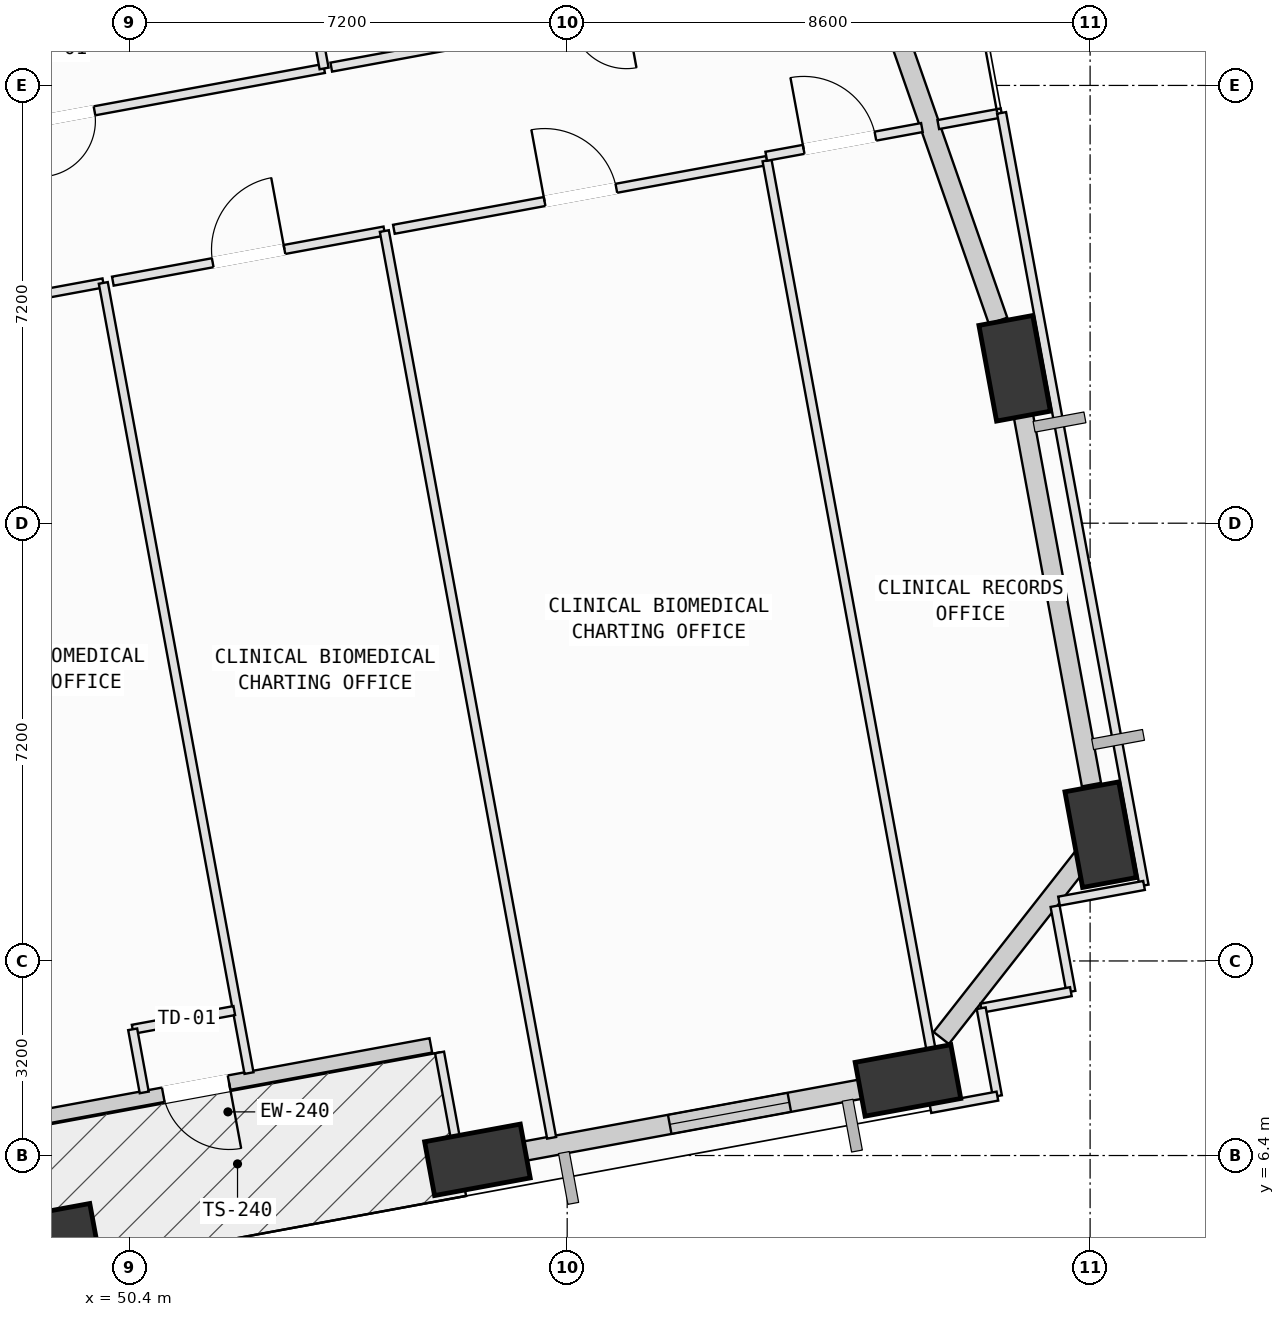
"""IFC4 building model, lengths in metres.
Left out: names, types, materials, properties, quantities, classifications, styles, units other than length and angle.
Written with IfcOpenShell. Run it as: python <this file> out.ifc"""

import sys

from ifc_helpers import new_model, si_unit, direction, frame, frame_2d, origin, origin_2d, place, context, subcontext, project, spatial, rectangle, extrude, element, fill, save


model = new_model("IFC4")
c1 = context("Model", 3, precision=1e-05, world=origin(), true_north=direction((0.0, 1.0)))
c2 = subcontext(c1, "Body", "Model", "MODEL_VIEW")
j1 = project(units=[si_unit("LENGTHUNIT", "METRE"), si_unit("PLANEANGLEUNIT", "RADIAN")], contexts=[c1])
p1 = place(None, origin())
s1 = spatial("IfcSite", under=j1, at=p1, CompositionType="ELEMENT")
p2 = place(p1, origin())
s2 = spatial("IfcBuilding", under=s1, at=p2, CompositionType="ELEMENT")
p3 = place(p2, frame((0.0, 0.0, 67.0)))
s3 = spatial("IfcBuildingStorey", under=s2, at=p3, CompositionType="ELEMENT", Elevation=67.0)
p4 = place(p3, frame((49.043, 5.023, 0.002), z_axis=(0.080992624248, 0.064344477929, 0.994635603112), x_axis=(-0.752977498779, 0.657778746776, 0.018761839526)))
e1 = element("IfcColumn", 1, at=p4, inside=s3, PredefinedType="COLUMN", context=c2, shape_type="SweptSolid", body=[
    extrude(rectangle(XDim=1.6, YDim=0.9, at=origin_2d()), origin(), (0.0, 0.0, 1.0), 4.018),
])
p5 = place(p3, frame((56.124, 6.329, 0.002), z_axis=(0.075202216603, 0.093335654317, 0.992790553063), x_axis=(-0.878753282804, 0.476780901997, 0.021740272603)))
e2 = element("IfcColumn", 2, at=p5, inside=s3, PredefinedType="COLUMN", context=c2, shape_type="SweptSolid", body=[
    extrude(rectangle(XDim=1.6, YDim=0.9, at=origin_2d()), origin(), (0.0, 0.0, 1.0), 4.026),
])
p6 = place(p3, frame((63.205, 7.635, 0.002), z_axis=(0.069432937009, 0.122112456291, 0.990084650561), x_axis=(-0.943645250183, 0.329976499913, 0.025478448008)))
e3 = element("IfcColumn", 3, at=p6, inside=s3, PredefinedType="COLUMN", context=c2, shape_type="SweptSolid", body=[
    extrude(rectangle(XDim=1.6, YDim=0.9, at=origin_2d()), origin(), (0.0, 0.0, 1.0), 4.037),
])
p7 = place(p3, frame((66.374, 11.677, 0.002), z_axis=(0.052706899267, 0.13484987645, 0.989463235088), x_axis=(-0.185294966749, -0.972313163776, 0.142382888173)))
e4 = element("IfcColumn", 4, at=p7, inside=s3, PredefinedType="COLUMN", context=c2, shape_type="SweptSolid", body=[
    extrude(rectangle(XDim=1.6, YDim=0.9, at=origin_2d()), origin(), (0.0, 0.0, 1.0), 4.039),
])
p8 = place(p3, frame((64.959, 19.348, 0.002), z_axis=(0.021317992834, 0.12905864412, 0.991407791759), x_axis=(0.020060394066, -0.99148872424, 0.128637826063)))
e5 = element("IfcColumn", 5, at=p8, inside=s3, PredefinedType="COLUMN", context=c2, shape_type="SweptSolid", body=[
    extrude(rectangle(XDim=1.6, YDim=0.9, at=origin_2d()), origin(), (0.0, 0.0, 1.0), 4.031),
])
p9 = place(p3, frame((55.358, 8.211, 0.0), z_axis=(0.0, 0.0, 1.0), x_axis=(-0.983411553053, -0.181388305362, 0.0)))
e6 = element("IfcWall", 6, at=p9, inside=s3, PredefinedType="SOLIDWALL", context=c2, shape_type="SweptSolid", body=[
    extrude(rectangle(XDim=6.96, YDim=0.24, at=frame_2d((3.48, 0.0))), origin(), (0.0, 0.0, 1.0), 3.165),
])
p10 = place(p9, frame((3.375, 0.0, 0.0)))
e7 = element("IfcOpeningElement", 7, at=p10, cuts=e6, PredefinedType="OPENING", context=c2, shape_type="SweptSolid", body=[
    extrude(rectangle(XDim=1.1, YDim=2.15, at=frame_2d((0.55, 1.075))), frame((0.0, 0.13, 0.0), z_axis=(0.0, -1.0, 0.0), x_axis=(1.0, 0.0, 0.0)), (0.0, 0.0, 1.0), 0.26),
])
p11 = place(p3, frame((62.826, 7.565, 0.0), z_axis=(0.0, 0.0, 1.0), x_axis=(-0.983418326153, -0.181351580599, 0.0)))
e8 = element("IfcWall", 8, at=p11, inside=s3, PredefinedType="SOLIDWALL", context=c2, shape_type="SweptSolid", body=[
    extrude(rectangle(XDim=6.045, YDim=0.32, at=frame_2d((3.022, 0.0))), origin(), (0.0, 0.0, 1.0), 3.145),
])
p12 = place(p11, frame((1.599, 0.0, 0.75)))
e9 = element("IfcOpeningElement", 9, at=p12, cuts=e8, PredefinedType="OPENING", context=c2, shape_type="SweptSolid", body=[
    extrude(rectangle(XDim=2.0, YDim=1.95, at=frame_2d((1.0, 0.975))), frame((0.0, 0.17, 0.0), z_axis=(0.0, -1.0, 0.0), x_axis=(1.0, 0.0, 0.0)), (0.0, 0.0, 1.0), 0.34),
])
p13 = place(p3, frame((66.175, 11.424, 0.0), z_axis=(0.0, 0.0, 1.0), x_axis=(-0.617077298218, -0.786902540359, 0.0)))
e10 = element("IfcWall", 10, at=p13, inside=s3, PredefinedType="SOLIDWALL", context=c2, shape_type="SweptSolid", body=[
    extrude(rectangle(XDim=3.927, YDim=0.32, at=frame_2d((1.964, 0.0))), origin(), (0.0, 0.0, 1.0), 3.165),
])
p14 = place(p3, frame((65.023, 19.0, 0.0), z_axis=(0.0, 0.0, 1.0), x_axis=(0.181377690028, -0.983413510971, 0.0)))
e11 = element("IfcWall", 11, at=p14, inside=s3, PredefinedType="SOLIDWALL", context=c2, shape_type="SweptSolid", body=[
    extrude(rectangle(XDim=6.61, YDim=0.32, at=frame_2d((3.305, 0.0))), origin(), (0.0, 0.0, 1.0), 3.165),
])
p15 = place(p3, frame((61.848, 28.26, 0.0), z_axis=(0.0, 0.0, 1.0), x_axis=(0.329546090906, -0.944139488618, 0.0)))
e12 = element("IfcWall", 12, at=p15, inside=s3, PredefinedType="SOLIDWALL", context=c2, shape_type="SweptSolid", body=[
    extrude(rectangle(XDim=8.614, YDim=0.32, at=frame_2d((4.307, 0.0))), origin(), (0.0, 0.0, 1.0), 3.165),
])
p16 = place(p3, frame((45.506, 19.929, 0.0), z_axis=(0.0, 0.0, 1.0), x_axis=(0.983432507903, 0.181274660113, 0.0)))
e13 = element("IfcWall", 13, at=p16, inside=s3, PredefinedType="PARTITIONING", context=c2, shape_type="SweptSolid", body=[
    extrude(rectangle(XDim=4.54, YDim=0.15, at=frame_2d((2.27, 0.0))), origin(), (0.0, 0.0, 1.0), 3.78),
])
p17 = place(p16, frame((1.67, 0.0, 0.0)))
e14 = element("IfcOpeningElement", 14, at=p17, cuts=e13, PredefinedType="OPENING", context=c2, shape_type="SweptSolid", body=[
    extrude(rectangle(XDim=1.2, YDim=2.15, at=frame_2d((0.6, 1.075))), frame((0.0, 0.085, 0.0), z_axis=(0.0, -1.0, 0.0), x_axis=(1.0, 0.0, 0.0)), (0.0, 0.0, 1.0), 0.17),
])
p18 = place(p3, frame((49.971, 20.752, 0.0), z_axis=(0.0, 0.0, 1.0), x_axis=(0.181310546622, -0.983425892319, 0.0)))
e15 = element("IfcWall", 15, at=p18, inside=s3, PredefinedType="PARTITIONING", context=c2, shape_type="SweptSolid", body=[
    extrude(rectangle(XDim=13.215, YDim=0.15, at=frame_2d((6.607, 0.0))), origin(), (0.0, 0.0, 1.0), 3.78),
])
p19 = place(p3, frame((52.125, 8.784, 0.0), z_axis=(0.0, 0.0, 1.0), x_axis=(-0.983446450717, -0.181199002682, 0.0)))
e16 = element("IfcWall", 16, at=p19, inside=s3, PredefinedType="PARTITIONING", context=c2, shape_type="SweptSolid", body=[
    extrude(rectangle(XDim=1.699, YDim=0.15, at=frame_2d((0.85, 0.0))), origin(), (0.0, 0.0, 1.0), 3.78),
])
p20 = place(p3, frame((50.454, 8.476, 0.0), z_axis=(0.0, 0.0, 1.0), x_axis=(0.179984667326, -0.983669415773, 0.0)))
e17 = element("IfcWall", 17, at=p20, inside=s3, PredefinedType="PARTITIONING", context=c2, shape_type="SweptSolid", body=[
    extrude(rectangle(XDim=1.055, YDim=0.15, at=frame_2d((0.528, 0.0))), origin(), (0.0, 0.0, 1.0), 3.78),
])
p21 = place(p3, frame((50.128, 20.781, 0.0), z_axis=(0.0, 0.0, 1.0), x_axis=(0.983395912318, 0.181473082403, 0.0)))
e18 = element("IfcWall", 18, at=p21, inside=s3, PredefinedType="PARTITIONING", context=c2, shape_type="SweptSolid", body=[
    extrude(rectangle(XDim=4.541, YDim=0.15, at=frame_2d((2.27, 0.0))), origin(), (0.0, 0.0, 1.0), 3.78),
])
p22 = place(p21, frame((1.67, 0.0, 0.0)))
e19 = element("IfcOpeningElement", 19, at=p22, cuts=e18, PredefinedType="OPENING", context=c2, shape_type="SweptSolid", body=[
    extrude(rectangle(XDim=1.2, YDim=2.15, at=frame_2d((0.6, 1.075))), frame((0.0, 0.085, 0.0), z_axis=(0.0, -1.0, 0.0), x_axis=(1.0, 0.0, 0.0)), (0.0, 0.0, 1.0), 0.17),
])
p23 = place(p3, frame((54.593, 21.605, 0.0), z_axis=(0.0, 0.0, 1.0), x_axis=(0.181395153652, -0.983410289875, 0.0)))
e20 = element("IfcWall", 20, at=p23, inside=s3, PredefinedType="PARTITIONING", context=c2, shape_type="SweptSolid", body=[
    extrude(rectangle(XDim=15.166, YDim=0.15, at=frame_2d((7.583, 0.0))), origin(), (0.0, 0.0, 1.0), 3.78),
])
p24 = place(p3, frame((56.923, 6.242, 0.0), z_axis=(0.0, 0.0, 1.0), x_axis=(-0.983559660352, -0.180583483541, 0.0)))
e21 = element("IfcWall", 21, at=p24, inside=s3, PredefinedType="PARTITIONING", context=c2, shape_type="SweptSolid", body=[
    extrude(rectangle(XDim=1.063, YDim=0.15, at=frame_2d((0.531, 0.0))), origin(), (0.0, 0.0, 1.0), 3.78),
])
p25 = place(p3, frame((55.878, 6.05, 0.0), z_axis=(0.0, 0.0, 1.0), x_axis=(-0.181281962035, 0.983431161923, 0.0)))
e22 = element("IfcWall", 22, at=p25, inside=s3, PredefinedType="PARTITIONING", context=c2, shape_type="SweptSolid", body=[
    extrude(rectangle(XDim=2.079, YDim=0.15, at=frame_2d((1.04, 0.0))), origin(), (0.0, 0.0, 1.0), 3.78),
])
p26 = place(p3, frame((54.75, 21.634, 0.0), z_axis=(0.0, 0.0, 1.0), x_axis=(0.983442731357, 0.181219188115, 0.0)))
e23 = element("IfcWall", 23, at=p26, inside=s3, PredefinedType="PARTITIONING", context=c2, shape_type="SweptSolid", body=[
    extrude(rectangle(XDim=6.24, YDim=0.15, at=frame_2d((3.12, 0.0))), origin(), (0.0, 0.0, 1.0), 3.78),
])
p27 = place(p26, frame((2.52, 0.0, 0.0)))
e24 = element("IfcOpeningElement", 24, at=p27, cuts=e23, PredefinedType="OPENING", context=c2, shape_type="SweptSolid", body=[
    extrude(rectangle(XDim=1.2, YDim=2.15, at=frame_2d((0.6, 1.075))), frame((0.0, 0.085, 0.0), z_axis=(0.0, -1.0, 0.0), x_axis=(1.0, 0.0, 0.0)), (0.0, 0.0, 1.0), 0.17),
])
p28 = place(p3, frame((60.887, 22.765, 0.0), z_axis=(0.0, 0.0, 1.0), x_axis=(0.181328083702, -0.983422658912, 0.0)))
e25 = element("IfcWall", 25, at=p28, inside=s3, PredefinedType="PARTITIONING", context=c2, shape_type="SweptSolid", body=[
    extrude(rectangle(XDim=15.529, YDim=0.15, at=frame_2d((7.765, 0.0))), origin(), (0.0, 0.0, 1.0), 3.78),
])
p29 = place(p3, frame((63.703, 7.493, 0.0), z_axis=(0.0, 0.0, 1.0), x_axis=(-0.983490875229, -0.18095772529, 0.0)))
e26 = element("IfcWall", 26, at=p29, inside=s3, PredefinedType="PARTITIONING", context=c2, shape_type="SweptSolid", body=[
    extrude(rectangle(XDim=0.85, YDim=0.15, at=frame_2d((0.425, 0.0))), origin(), (0.0, 0.0, 1.0), 3.78),
])
p30 = place(p3, frame((53.602, 24.279, 0.0), z_axis=(0.0, 0.0, 1.0), x_axis=(-0.983407902238, -0.181408097439, 0.0)))
e27 = element("IfcWall", 27, at=p30, inside=s3, PredefinedType="PARTITIONING", context=c2, shape_type="SweptSolid", body=[
    extrude(rectangle(XDim=8.6, YDim=0.15, at=frame_2d((4.3, 0.0))), origin(), (0.0, 0.0, 1.0), 3.78),
])
p31 = place(p30, frame((3.84, 0.0, 0.0)))
e28 = element("IfcOpeningElement", 28, at=p31, cuts=e27, PredefinedType="OPENING", context=c2, shape_type="SweptSolid", body=[
    extrude(rectangle(XDim=0.92, YDim=2.1, at=frame_2d((0.46, 1.05))), frame((0.0, 0.085, 0.0), z_axis=(0.0, -1.0, 0.0), x_axis=(1.0, 0.0, 0.0)), (0.0, 0.0, 1.0), 0.17),
])
p32 = place(p3, frame((53.12, 26.89, 0.0), z_axis=(0.0, 0.0, 1.0), x_axis=(0.181522853733, -0.983386726356, 0.0)))
e29 = element("IfcWall", 29, at=p32, inside=s3, PredefinedType="PARTITIONING", context=c2, shape_type="SweptSolid", body=[
    extrude(rectangle(XDim=2.655, YDim=0.15, at=frame_2d((1.328, 0.0))), origin(), (0.0, 0.0, 1.0), 3.78),
])
p33 = place(p3, frame((62.521, 25.924, 0.0), z_axis=(0.0, 0.0, 1.0), x_axis=(-0.983417228319, -0.181357533742, 0.0)))
e30 = element("IfcWall", 30, at=p33, inside=s3, PredefinedType="PARTITIONING", context=c2, shape_type="SweptSolid", body=[
    extrude(rectangle(XDim=8.949, YDim=0.15, at=frame_2d((4.475, 0.0))), origin(), (0.0, 0.0, 1.0), 3.78),
])
p34 = place(p33, frame((4.015, 0.0, 0.0)))
e31 = element("IfcOpeningElement", 31, at=p34, cuts=e30, PredefinedType="OPENING", context=c2, shape_type="SweptSolid", body=[
    extrude(rectangle(XDim=0.92, YDim=2.1, at=frame_2d((0.46, 1.05))), frame((0.0, 0.085, 0.0), z_axis=(0.0, -1.0, 0.0), x_axis=(1.0, 0.0, 0.0)), (0.0, 0.0, 1.0), 0.17),
])
p35 = place(p3, frame((65.624, 10.502, 0.0), z_axis=(0.0, 0.0, 1.0), x_axis=(0.181722638549, -0.983349827192, 0.0)))
e32 = element("IfcWall", 32, at=p35, inside=s3, PredefinedType="PARTITIONING", context=c2, shape_type="SweptSolid", body=[
    extrude(rectangle(XDim=1.431, YDim=0.15, at=frame_2d((0.715, 0.0))), origin(), (0.0, 0.0, 1.0), 3.78),
])
p36 = place(p3, frame((65.884, 9.095, 0.0), z_axis=(0.0, 0.0, 1.0), x_axis=(-0.983424177059, -0.181319849924, 0.0)))
e33 = element("IfcWall", 33, at=p36, inside=s3, PredefinedType="PARTITIONING", context=c2, shape_type="SweptSolid", body=[
    extrude(rectangle(XDim=1.5, YDim=0.15, at=frame_2d((0.75, 0.0))), origin(), (0.0, 0.0, 1.0), 3.78),
])
p37 = place(p3, frame((64.409, 8.823, 0.0), z_axis=(0.0, 0.0, 1.0), x_axis=(0.180989152548, -0.983485092241, 0.0)))
e34 = element("IfcWall", 34, at=p37, inside=s3, PredefinedType="PARTITIONING", context=c2, shape_type="SweptSolid", body=[
    extrude(rectangle(XDim=1.47, YDim=0.15, at=frame_2d((0.735, 0.0))), origin(), (0.0, 0.0, 1.0), 3.78),
])
p38 = place(p3, frame((64.675, 7.377, 0.0), z_axis=(0.0, 0.0, 1.0), x_axis=(-0.983445008558, -0.181206829736, 0.0)))
e35 = element("IfcWall", 35, at=p38, inside=s3, PredefinedType="PARTITIONING", context=c2, shape_type="SweptSolid", body=[
    extrude(rectangle(XDim=1.12, YDim=0.15, at=frame_2d((0.56, 0.0))), origin(), (0.0, 0.0, 1.0), 3.78),
])
p39 = place(p3, frame((60.874, 22.835, 0.0), z_axis=(0.0, 0.0, 1.0), x_axis=(0.98343031554, 0.181286553494, 0.0)))
e36 = element("IfcWall", 36, at=p39, inside=s3, PredefinedType="PARTITIONING", context=c2, shape_type="SweptSolid", body=[
    extrude(rectangle(XDim=2.603, YDim=0.15, at=frame_2d((1.302, 0.0))), origin(), (0.0, 0.0, 1.0), 3.78),
])
p40 = place(p39, frame((0.626, 0.0, 0.0)))
e37 = element("IfcOpeningElement", 37, at=p40, cuts=e36, PredefinedType="OPENING", context=c2, shape_type="SweptSolid", body=[
    extrude(rectangle(XDim=1.2, YDim=2.15, at=frame_2d((0.6, 1.075))), frame((0.0, 0.085, 0.0), z_axis=(0.0, -1.0, 0.0), x_axis=(1.0, 0.0, 0.0)), (0.0, 0.0, 1.0), 0.17),
])
p41 = place(p3, frame((63.703, 23.356, 0.0), z_axis=(0.0, 0.0, 1.0), x_axis=(0.983390414143, 0.18150287428, 0.0)))
e38 = element("IfcWall", 38, at=p41, inside=s3, PredefinedType="PARTITIONING", context=c2, shape_type="SweptSolid", body=[
    extrude(rectangle(XDim=1.059, YDim=0.15, at=frame_2d((0.529, 0.0))), origin(), (0.0, 0.0, 1.0), 3.78),
])
p42 = place(p3, frame((64.744, 23.548, 0.0), z_axis=(0.0, 0.0, 1.0), x_axis=(0.18134422217, -0.983419683088, 0.0)))
e39 = element("IfcWall", 39, at=p42, inside=s3, PredefinedType="PARTITIONING", context=c2, shape_type="SweptSolid", body=[
    extrude(rectangle(XDim=12.92, YDim=0.15, at=frame_2d((6.46, 0.0))), origin(), (0.0, 0.0, 1.0), 3.165),
])
p43 = place(p3, frame((67.087, 10.842, 0.0), z_axis=(0.0, 0.0, 1.0), x_axis=(-0.983385482168, -0.181529593897, 0.0)))
e40 = element("IfcWall", 40, at=p43, inside=s3, PredefinedType="PARTITIONING", context=c2, shape_type="SweptSolid", body=[
    extrude(rectangle(XDim=1.422, YDim=0.15, at=frame_2d((0.711, 0.0))), origin(), (0.0, 0.0, 1.0), 3.78),
])
p44 = place(p10, origin())
e41 = element("IfcDoor", 41, at=p44, inside=s3, OperationType="SINGLE_SWING_LEFT", PredefinedType="DOOR", context=c2, shape_type="SweptSolid", body=[
    extrude(rectangle(XDim=1.1, YDim=2.15, at=frame_2d((0.55, 1.075))), frame((0.0, 0.025, 0.0), z_axis=(0.0, -1.0, 0.0), x_axis=(1.0, 0.0, 0.0)), (0.0, 0.0, 1.0), 0.05),
])
fill(e7, e41)
p45 = place(p12, origin())
e42 = element("IfcWindow", 42, at=p45, inside=s3, PartitioningType="SINGLE_PANEL", PredefinedType="WINDOW", context=c2, shape_type="SweptSolid", body=[
    extrude(rectangle(XDim=2.0, YDim=1.95, at=frame_2d((1.0, 0.975))), frame((0.0, 0.03, 0.0), z_axis=(0.0, -1.0, 0.0), x_axis=(1.0, 0.0, 0.0)), (0.0, 0.0, 1.0), 0.06),
])
fill(e9, e42)
p46 = place(p22, origin())
e43 = element("IfcDoor", 43, at=p46, inside=s3, OperationType="SINGLE_SWING_RIGHT", PredefinedType="DOOR", context=c2, shape_type="SweptSolid", body=[
    extrude(rectangle(XDim=1.2, YDim=2.15, at=frame_2d((0.6, 1.075))), frame((0.0, 0.025, 0.0), z_axis=(0.0, -1.0, 0.0), x_axis=(1.0, 0.0, 0.0)), (0.0, 0.0, 1.0), 0.05),
])
fill(e19, e43)
p47 = place(p27, origin())
e44 = element("IfcDoor", 44, at=p47, inside=s3, OperationType="SINGLE_SWING_LEFT", PredefinedType="DOOR", context=c2, shape_type="SweptSolid", body=[
    extrude(rectangle(XDim=1.2, YDim=2.15, at=frame_2d((0.6, 1.075))), frame((0.0, 0.025, 0.0), z_axis=(0.0, -1.0, 0.0), x_axis=(1.0, 0.0, 0.0)), (0.0, 0.0, 1.0), 0.05),
])
fill(e24, e44)
p48 = place(p31, origin())
e45 = element("IfcDoor", 45, at=p48, inside=s3, OperationType="SINGLE_SWING_RIGHT", PredefinedType="DOOR", context=c2, shape_type="SweptSolid", body=[
    extrude(rectangle(XDim=0.92, YDim=2.1, at=frame_2d((0.46, 1.05))), frame((0.0, 0.025, 0.0), z_axis=(0.0, -1.0, 0.0), x_axis=(1.0, 0.0, 0.0)), (0.0, 0.0, 1.0), 0.05),
])
fill(e28, e45)
p49 = place(p40, origin())
e46 = element("IfcDoor", 46, at=p49, inside=s3, OperationType="SINGLE_SWING_LEFT", PredefinedType="DOOR", context=c2, shape_type="SweptSolid", body=[
    extrude(rectangle(XDim=1.2, YDim=2.15, at=frame_2d((0.6, 1.075))), frame((0.0, 0.025, 0.0), z_axis=(0.0, -1.0, 0.0), x_axis=(1.0, 0.0, 0.0)), (0.0, 0.0, 1.0), 0.05),
])
fill(e37, e46)
save(model, sys.argv[1])
